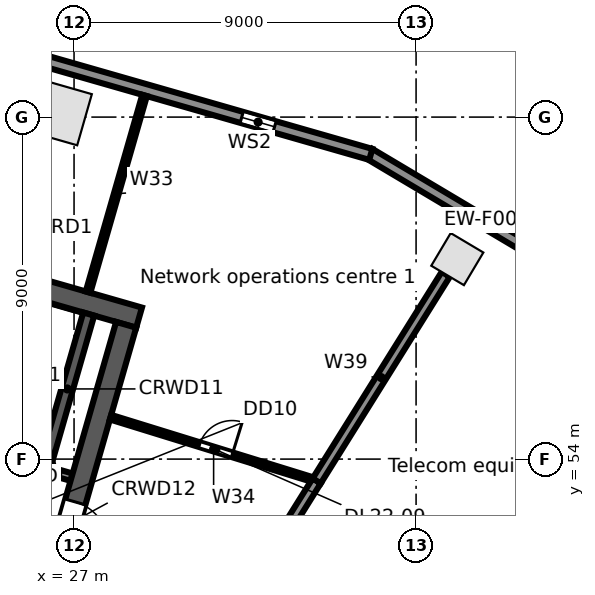
"""IFC4 building model, lengths in metres.
Left out: names, types, materials, properties, quantities, classifications, styles, units other than length and angle.
Written with IfcOpenShell. Run it as: python <this file> out.ifc"""

import sys

from ifc_helpers import new_model, si_unit, direction, frame, frame_2d, origin, origin_2d, place, context, subcontext, project, spatial, rectangle, extrude, element, fill, save


model = new_model("IFC4")
c1 = context("Model", 3, precision=1e-05, world=origin(), true_north=direction((0.0, 1.0)))
c2 = subcontext(c1, "Body", "Model", "MODEL_VIEW")
j1 = project(units=[si_unit("LENGTHUNIT", "METRE"), si_unit("PLANEANGLEUNIT", "RADIAN")], contexts=[c1])
p1 = place(None, origin())
s1 = spatial("IfcSite", under=j1, at=p1, CompositionType="ELEMENT")
p2 = place(p1, origin())
s2 = spatial("IfcBuilding", under=s1, at=p2, CompositionType="ELEMENT")
p3 = place(p2, frame((0.0, 0.0, 110.3)))
s3 = spatial("IfcBuildingStorey", under=s2, at=p3, CompositionType="ELEMENT", Elevation=110.3)
p4 = place(p3, frame((37.085, 59.262, 0.0), z_axis=(0.0, 0.0, 1.0), x_axis=(-0.859406411501, 0.511293086077, 0.0)))
e1 = element("IfcColumn", 1, at=p4, inside=s3, PredefinedType="COLUMN", context=c2, shape_type="SweptSolid", body=[
    extrude(rectangle(XDim=1.0, YDim=1.0, at=origin_2d()), origin(), (0.0, 0.0, 1.0), 4.4),
])
p5 = place(p3, frame((26.603, 63.124, 0.0), z_axis=(0.0, 0.0, 1.0), x_axis=(-0.961261695938, 0.275637355817, 0.0)))
e2 = element("IfcColumn", 2, at=p5, inside=s3, PredefinedType="COLUMN", context=c2, shape_type="SweptSolid", body=[
    extrude(rectangle(XDim=1.4, YDim=1.4, at=origin_2d()), origin(), (0.0, 0.0, 1.0), 4.4),
])
p6 = place(p3, frame((34.773, 62.034, 0.0), z_axis=(0.0, 0.0, 1.0), x_axis=(0.859401317772, -0.511301647769, 0.0)))
e3 = element("IfcWall", 3, at=p6, inside=s3, PredefinedType="STANDARD", context=c2, shape_type="SweptSolid", body=[
    extrude(rectangle(XDim=6.808, YDim=0.3, at=frame_2d((3.404, 0.0))), origin(), (0.0, 0.0, 1.0), 4.08),
])
p7 = place(p3, frame((3.335, 71.044, 0.0), z_axis=(0.0, 0.0, 1.0), x_axis=(0.961260130989, -0.275642813387, 0.0)))
e4 = element("IfcWall", 4, at=p7, inside=s3, PredefinedType="STANDARD", context=c2, shape_type="SweptSolid", body=[
    extrude(rectangle(XDim=32.741, YDim=0.3, at=frame_2d((16.371, 0.0))), origin(), (0.0, 0.0, 1.0), 4.08),
])
p8 = place(p7, frame((29.207, 0.0, 0.6)))
e5 = element("IfcOpeningElement", 5, at=p8, cuts=e4, PredefinedType="OPENING", context=c2, shape_type="SweptSolid", body=[
    extrude(rectangle(XDim=0.9, YDim=2.8, at=frame_2d((0.45, 1.4))), frame((0.0, 0.16, 0.0), z_axis=(0.0, -1.0, 0.0), x_axis=(1.0, 0.0, 0.0)), (0.0, 0.0, 1.0), 0.32),
])
p9 = place(p7, frame((21.034, 0.0, 0.6)))
e6 = element("IfcOpeningElement", 6, at=p9, cuts=e4, PredefinedType="OPENING", context=c2, shape_type="SweptSolid", body=[
    extrude(rectangle(XDim=0.9, YDim=2.8, at=frame_2d((0.45, 1.4))), frame((0.0, 0.16, 0.0), z_axis=(0.0, -1.0, 0.0), x_axis=(1.0, 0.0, 0.0)), (0.0, 0.0, 1.0), 0.32),
])
p10 = place(p7, frame((12.861, 0.0, 0.6)))
e7 = element("IfcOpeningElement", 7, at=p10, cuts=e4, PredefinedType="OPENING", context=c2, shape_type="SweptSolid", body=[
    extrude(rectangle(XDim=0.9, YDim=2.8, at=frame_2d((0.45, 1.4))), frame((0.0, 0.16, 0.0), z_axis=(0.0, -1.0, 0.0), x_axis=(1.0, 0.0, 0.0)), (0.0, 0.0, 1.0), 0.32),
])
p11 = place(p7, frame((4.688, 0.0, 0.6)))
e8 = element("IfcOpeningElement", 8, at=p11, cuts=e4, PredefinedType="OPENING", context=c2, shape_type="SweptSolid", body=[
    extrude(rectangle(XDim=0.9, YDim=2.8, at=frame_2d((0.45, 1.4))), frame((0.0, 0.16, 0.0), z_axis=(0.0, -1.0, 0.0), x_axis=(1.0, 0.0, 0.0)), (0.0, 0.0, 1.0), 0.32),
])
p12 = place(p3, frame((26.214, 53.732, 0.0), z_axis=(0.0, 0.0, 1.0), x_axis=(0.961240918172, -0.275709806194, 0.0)))
e9 = element("IfcWall", 9, at=p12, inside=s3, PredefinedType="SOLIDWALL", context=c2, shape_type="SweptSolid", body=[
    extrude(rectangle(XDim=0.75, YDim=0.2, at=frame_2d((0.375, 0.0))), origin(), (0.0, 0.0, 1.0), 4.08),
])
p13 = place(p3, frame((20.06, 60.204, 0.0), z_axis=(0.0, 0.0, 1.0), x_axis=(0.96126248289, -0.275634611374, 0.0)))
e10 = element("IfcWall", 10, at=p13, inside=s3, PredefinedType="SOLIDWALL", context=c2, shape_type="SweptSolid", body=[
    extrude(rectangle(XDim=9.0, YDim=0.55, at=frame_2d((4.5, 0.0))), origin(), (0.0, 0.0, 1.0), 4.08),
])
p14 = place(p3, frame((26.256, 53.876, 0.0), z_axis=(0.0, 0.0, 1.0), x_axis=(0.275641165445, 0.961260603537, 0.0)))
e11 = element("IfcWall", 11, at=p14, inside=s3, PredefinedType="SOLIDWALL", context=c2, shape_type="SweptSolid", body=[
    extrude(rectangle(XDim=4.1, YDim=0.3, at=frame_2d((2.05, 0.0))), origin(), (0.0, 0.0, 1.0), 4.08),
])
p15 = place(p3, frame((25.366, 47.057, 0.0), z_axis=(0.0, 0.0, 1.0), x_axis=(0.275632146085, 0.96126318979, 0.0)))
e12 = element("IfcWall", 12, at=p15, inside=s3, PredefinedType="SOLIDWALL", context=c2, shape_type="SweptSolid", body=[
    extrude(rectangle(XDim=10.9, YDim=0.55, at=frame_2d((5.45, 0.0))), origin(), (0.0, 0.0, 1.0), 4.08),
])
p16 = place(p15, frame((4.85, 0.0, 0.0)))
e13 = element("IfcOpeningElement", 13, at=p16, cuts=e12, PredefinedType="OPENING", context=c2, shape_type="SweptSolid", body=[
    extrude(rectangle(XDim=1.2, YDim=2.1, at=frame_2d((0.6, 1.05))), frame((0.0, 0.285, 0.0), z_axis=(0.0, -1.0, 0.0), x_axis=(1.0, 0.0, 0.0)), (0.0, 0.0, 1.0), 0.57),
])
p17 = place(p3, frame((27.368, 58.394, 0.0), z_axis=(0.0, 0.0, 1.0), x_axis=(0.276295387056, 0.961072764722, 0.0)))
e14 = element("IfcWall", 14, at=p17, inside=s3, PredefinedType="PARTITIONING", context=c2, shape_type="SweptSolid", body=[
    extrude(rectangle(XDim=5.386, YDim=0.125, at=frame_2d((2.693, 0.0))), origin(), (0.0, 0.0, 1.0), 3.142),
])
p18 = place(p3, frame((27.96, 55.103, 0.0), z_axis=(0.0, 0.0, 1.0), x_axis=(0.955442775069, -0.29517639399, 0.0)))
e15 = element("IfcWall", 15, at=p18, inside=s3, PredefinedType="PARTITIONING", context=c2, shape_type="SweptSolid", body=[
    extrude(rectangle(XDim=5.678, YDim=0.125, at=frame_2d((2.839, 0.0))), origin(), (0.0, 0.0, 1.0), 3.142),
])
p19 = place(p18, frame((2.45, 0.0, 0.0)))
e16 = element("IfcOpeningElement", 16, at=p19, cuts=e15, PredefinedType="OPENING", context=c2, shape_type="SweptSolid", body=[
    extrude(rectangle(XDim=0.9, YDim=2.1, at=frame_2d((0.45, 1.05))), frame((0.0, 0.073, 0.0), z_axis=(0.0, -1.0, 0.0), x_axis=(1.0, 0.0, 0.0)), (0.0, 0.0, 1.0), 0.145),
])
p20 = place(p3, frame((29.675, 47.491, 0.0), z_axis=(0.0, 0.0, 1.0), x_axis=(0.529992669945, 0.848002222759, 0.0)))
e17 = element("IfcWall", 17, at=p20, inside=s3, PredefinedType="PARTITIONING", context=c2, shape_type="SweptSolid", body=[
    extrude(rectangle(XDim=7.0, YDim=0.25, at=frame_2d((3.5, 0.0))), origin(), (0.0, 0.0, 1.0), 3.142),
])
p21 = place(p3, frame((33.385, 53.427, 0.0), z_axis=(0.0, 0.0, 1.0), x_axis=(0.52989620904, 0.848062502204, 0.0)))
e18 = element("IfcWall", 18, at=p21, inside=s3, PredefinedType="PARTITIONING", context=c2, shape_type="SweptSolid", body=[
    extrude(rectangle(XDim=6.409, YDim=0.25, at=frame_2d((3.204, 0.0))), origin(), (0.0, 0.0, 1.0), 3.142),
])
p22 = place(p8, origin())
e19 = element("IfcWindow", 19, at=p22, inside=s3, PartitioningType="SINGLE_PANEL", PredefinedType="WINDOW", context=c2, shape_type="SweptSolid", body=[
    extrude(rectangle(XDim=0.9, YDim=2.8, at=frame_2d((0.45, 1.4))), frame((0.0, 0.03, 0.0), z_axis=(0.0, -1.0, 0.0), x_axis=(1.0, 0.0, 0.0)), (0.0, 0.0, 1.0), 0.06),
])
fill(e5, e19)
p23 = place(p16, frame((1.2, 0.0, 0.0), z_axis=(0.0, 0.0, 1.0), x_axis=(-1.0, 0.0, 0.0)))
e20 = element("IfcDoor", 20, at=p23, inside=s3, OperationType="SINGLE_SWING_RIGHT", PredefinedType="DOOR", context=c2, shape_type="SweptSolid", body=[
    extrude(rectangle(XDim=1.2, YDim=2.1, at=frame_2d((0.6, 1.05))), frame((0.0, 0.025, 0.0), z_axis=(0.0, -1.0, 0.0), x_axis=(1.0, 0.0, 0.0)), (0.0, 0.0, 1.0), 0.05),
])
fill(e13, e20)
p24 = place(p19, origin())
e21 = element("IfcDoor", 21, at=p24, inside=s3, OperationType="SINGLE_SWING_RIGHT", PredefinedType="DOOR", context=c2, shape_type="SweptSolid", body=[
    extrude(rectangle(XDim=0.9, YDim=2.1, at=frame_2d((0.45, 1.05))), frame((0.0, 0.025, 0.0), z_axis=(0.0, -1.0, 0.0), x_axis=(1.0, 0.0, 0.0)), (0.0, 0.0, 1.0), 0.05),
])
fill(e16, e21)
save(model, sys.argv[1])
